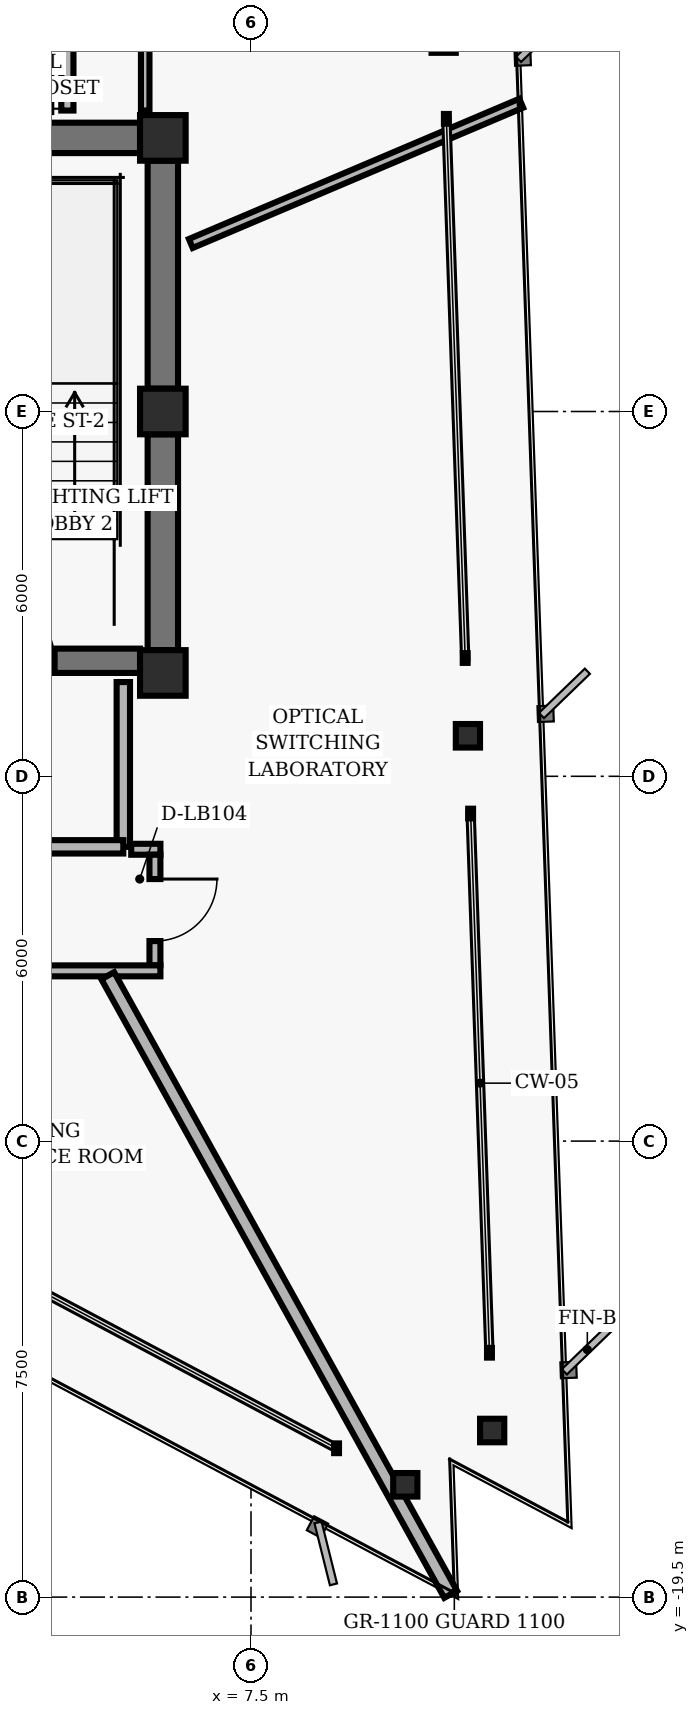
"""IFC4 building model, lengths in metres.
Left out: names, types, materials, properties, quantities, classifications, styles, units other than length and angle.
Written with IfcOpenShell. Run it as: python <this file> out.ifc"""

import sys

from ifc_helpers import new_model, si_unit, direction, frame, frame_2d, origin, origin_2d, place, context, subcontext, project, spatial, rectangle, hollow_rectangle, i_section, extrude, element, fill, save


model = new_model("IFC4")
c1 = context("Model", 3, precision=1e-05, world=origin(), true_north=direction((0.0, 1.0)))
c2 = subcontext(c1, "Body", "Model", "MODEL_VIEW")
j1 = project(units=[si_unit("LENGTHUNIT", "METRE"), si_unit("PLANEANGLEUNIT", "RADIAN")], contexts=[c1])
p1 = place(None, origin())
s1 = spatial("IfcSite", under=j1, at=p1, CompositionType="ELEMENT")
p2 = place(p1, origin())
s2 = spatial("IfcBuilding", under=s1, at=p2, CompositionType="ELEMENT")
p3 = place(p2, frame((0.0, 0.0, 199.68)))
s3 = spatial("IfcBuildingStorey", under=s2, at=p3, CompositionType="ELEMENT", Elevation=199.68)
for number, where, z_axis, x_axis in (
    (1, (6.05, 4.5, 0.0), (0.0, 0.0, 1.0), (1.0, 0.0, 0.0)),
    (2, (6.05, 0.0, 0.0), (0.0, 0.0, 1.0), (1.0, 0.0, 0.0)),
    (3, (6.05, -4.3, 0.0), (0.0, 0.0, 1.0), (1.0, 0.0, 0.0)),
):
    element("IfcColumn", number, at=place(p3, frame(where, z_axis=z_axis, x_axis=x_axis)), inside=s3, PredefinedType="COLUMN", context=c2, shape_type="SweptSolid", body=[
        extrude(hollow_rectangle(XDim=0.75, YDim=0.75, WallThickness=0.05, InnerFilletRadius=0.02, OuterFilletRadius=0.04, at=origin_2d()), origin(), (0.0, 0.0, 1.0), 3.04),
    ])
p4 = place(p3, frame((6.05, 0.375, 0.0), z_axis=(0.0, 0.0, 1.0), x_axis=(0.0, 1.0, 0.0)))
e4 = element("IfcWall", 4, at=p4, inside=s3, PredefinedType="SHEAR", context=c2, shape_type="SweptSolid", body=[
    extrude(rectangle(XDim=3.75, YDim=0.5, at=frame_2d((1.875, 0.0))), origin(), (0.0, 0.0, 1.0), 2.798),
])
p5 = place(p3, frame((6.05, -3.925, 0.0), z_axis=(0.0, 0.0, 1.0), x_axis=(0.0, 1.0, 0.0)))
e5 = element("IfcWall", 5, at=p5, inside=s3, PredefinedType="SHEAR", context=c2, shape_type="SweptSolid", body=[
    extrude(rectangle(XDim=3.55, YDim=0.5, at=frame_2d((1.775, 0.0))), origin(), (0.0, 0.0, 1.0), 2.798),
])
p6 = place(p3, frame((-5.675, -4.1, 0.0), z_axis=(0.0, 0.0, 1.0), x_axis=(1.0, 0.0, 0.0)))
e6 = element("IfcWall", 6, at=p6, inside=s3, PredefinedType="SHEAR", context=c2, shape_type="SweptSolid", body=[
    extrude(rectangle(XDim=11.35, YDim=0.4, at=frame_2d((5.675, 0.0))), origin(), (0.0, 0.0, 1.0), 2.798),
])
p7 = place(p6, frame((1.405, 0.0, 0.0)))
e7 = element("IfcOpeningElement", 7, at=p7, cuts=e6, PredefinedType="OPENING", context=c2, shape_type="SweptSolid", body=[
    extrude(rectangle(XDim=1.1, YDim=2.04, at=frame_2d((0.55, 1.02))), frame((0.0, 0.21, 0.0), z_axis=(0.0, -1.0, 0.0), x_axis=(1.0, 0.0, 0.0)), (0.0, 0.0, 1.0), 0.42),
])
p8 = place(p6, frame((8.845, 0.0, 0.0)))
e8 = element("IfcOpeningElement", 8, at=p8, cuts=e6, PredefinedType="OPENING", context=c2, shape_type="SweptSolid", body=[
    extrude(rectangle(XDim=1.1, YDim=2.04, at=frame_2d((0.55, 1.02))), frame((0.0, 0.21, 0.0), z_axis=(0.0, -1.0, 0.0), x_axis=(1.0, 0.0, 0.0)), (0.0, 0.0, 1.0), 0.42),
])
p9 = place(p6, frame((4.145, 0.0, 0.0)))
e9 = element("IfcOpeningElement", 9, at=p9, cuts=e6, PredefinedType="OPENING", context=c2, shape_type="SweptSolid", body=[
    extrude(rectangle(XDim=1.06, YDim=2.04, at=frame_2d((0.53, 1.02))), frame((0.0, 0.21, 0.0), z_axis=(0.0, -1.0, 0.0), x_axis=(1.0, 0.0, 0.0)), (0.0, 0.0, 1.0), 0.42),
])
p10 = place(p6, frame((6.145, 0.0, 0.0)))
e10 = element("IfcOpeningElement", 10, at=p10, cuts=e6, PredefinedType="OPENING", context=c2, shape_type="SweptSolid", body=[
    extrude(rectangle(XDim=1.06, YDim=2.04, at=frame_2d((0.53, 1.02))), frame((0.0, 0.21, 0.0), z_axis=(0.0, -1.0, 0.0), x_axis=(1.0, 0.0, 0.0)), (0.0, 0.0, 1.0), 0.42),
])
p11 = place(p3, frame((2.05, 4.5, 0.0), z_axis=(0.0, 0.0, 1.0), x_axis=(1.0, 0.0, 0.0)))
e11 = element("IfcWall", 11, at=p11, inside=s3, PredefinedType="SHEAR", context=c2, shape_type="SweptSolid", body=[
    extrude(rectangle(XDim=3.625, YDim=0.5, at=frame_2d((1.812, 0.0))), origin(), (0.0, 0.0, 1.0), 2.798),
])
for number, where, z_axis, x_axis in (
    (12, (11.466, -16.76, 0.0), (0.0, 0.0, 1.0), (1.0, 0.0, 0.0)),
    (13, (11.067, -5.334, 0.0), (0.0, 0.0, 1.0), (1.0, 0.0, 0.0)),
    (14, (10.668, 6.093, 0.0), (0.0, 0.0, 1.0), (1.0, 0.0, 0.0)),
    (15, (10.037, -17.653, 0.0), (0.0, 0.0, 1.0), (1.0, 0.0, 0.0)),
):
    element("IfcColumn", number, at=place(p3, frame(where, z_axis=z_axis, x_axis=x_axis)), inside=s3, PredefinedType="COLUMN", context=c2, shape_type="SweptSolid", body=[
        extrude(i_section(OverallWidth=0.398, OverallDepth=0.387, WebThickness=0.021, FlangeThickness=0.033, FilletRadius=0.018, at=origin_2d()), origin(), (0.0, 0.0, 1.0), 3.04),
    ])
p12 = place(p3, frame((5.4, -7.16, 0.0), z_axis=(0.0, 0.0, 1.0), x_axis=(0.0, 1.0, 0.0)))
e16 = element("IfcWall", 16, at=p12, inside=s3, PredefinedType="PARTITIONING", context=c2, shape_type="SweptSolid", body=[
    extrude(rectangle(XDim=2.71, YDim=0.22, at=frame_2d((1.355, 0.0))), origin(), (0.0, 0.0, 1.0), 2.773),
])
p13 = place(p3, frame((0.0, -7.16, 0.0), z_axis=(0.0, 0.0, 1.0), x_axis=(1.0, 0.0, 0.0)))
e17 = element("IfcWall", 17, at=p13, inside=s3, PredefinedType="PARTITIONING", context=c2, shape_type="SweptSolid", body=[
    extrude(rectangle(XDim=5.4, YDim=0.22, at=frame_2d((2.7, 0.0))), origin(), (0.0, 0.0, 1.0), 2.773),
])
p14 = place(p13, frame((2.05, 0.0, 0.0)))
e18 = element("IfcOpeningElement", 18, at=p14, cuts=e17, PredefinedType="OPENING", context=c2, shape_type="SweptSolid", body=[
    extrude(rectangle(XDim=1.12, YDim=2.02, at=frame_2d((0.56, 1.01))), frame((0.0, 0.12, 0.0), z_axis=(0.0, -1.0, 0.0), x_axis=(1.0, 0.0, 0.0)), (0.0, 0.0, 1.0), 0.24),
])
p15 = place(p3, frame((4.48, 4.95, 0.0), z_axis=(0.0, 0.0, 1.0), x_axis=(0.0, 1.0, 0.0)))
e19 = element("IfcWall", 19, at=p15, inside=s3, PredefinedType="PARTITIONING", context=c2, shape_type="SweptSolid", body=[
    extrude(rectangle(XDim=2.1, YDim=0.2, at=frame_2d((1.05, 0.0))), origin(), (0.0, 0.0, 1.0), 2.773),
])
p16 = place(p3, frame((5.76, 4.95, 0.0), z_axis=(0.0, 0.0, 1.0), x_axis=(0.0, 1.0, 0.0)))
e20 = element("IfcWall", 20, at=p16, inside=s3, PredefinedType="PARTITIONING", context=c2, shape_type="SweptSolid", body=[
    extrude(rectangle(XDim=2.1, YDim=0.14, at=frame_2d((1.05, 0.0))), origin(), (0.0, 0.0, 1.0), 2.253),
])
p17 = place(p3, frame((5.53, -7.2, 0.0), z_axis=(0.0, 0.0, 1.0), x_axis=(1.0, 0.0, 0.0)))
e21 = element("IfcWall", 21, at=p17, inside=s3, PredefinedType="PARTITIONING", context=c2, shape_type="SweptSolid", body=[
    extrude(rectangle(XDim=0.48, YDim=0.18, at=frame_2d((0.24, 0.0))), origin(), (0.0, 0.0, 1.0), 2.773),
])
p18 = place(p3, frame((5.92, -7.29, 0.0), z_axis=(0.0, 0.0, 1.0), x_axis=(0.0, -1.0, 0.0)))
e22 = element("IfcWall", 22, at=p18, inside=s3, PredefinedType="PARTITIONING", context=c2, shape_type="SweptSolid", body=[
    extrude(rectangle(XDim=1.82, YDim=0.18, at=frame_2d((0.91, 0.0))), origin(), (0.0, 0.0, 1.0), 2.773),
])
p19 = place(p18, frame((0.4, 0.0, 0.0)))
e23 = element("IfcOpeningElement", 23, at=p19, cuts=e22, PredefinedType="OPENING", context=c2, shape_type="SweptSolid", body=[
    extrude(rectangle(XDim=1.02, YDim=2.02, at=frame_2d((0.51, 1.01))), frame((0.0, 0.1, 0.0), z_axis=(0.0, -1.0, 0.0), x_axis=(1.0, 0.0, 0.0)), (0.0, 0.0, 1.0), 0.2),
])
p20 = place(p3, frame((6.01, -9.2, 0.0), z_axis=(0.0, 0.0, 1.0), x_axis=(-1.0, 0.0, 0.0)))
e24 = element("IfcWall", 24, at=p20, inside=s3, PredefinedType="PARTITIONING", context=c2, shape_type="SweptSolid", body=[
    extrude(rectangle(XDim=13.3, YDim=0.18, at=frame_2d((6.65, 0.0))), origin(), (0.0, 0.0, 1.0), 2.395),
])
p21 = place(p20, frame((9.948, 0.0, 0.0)))
e25 = element("IfcOpeningElement", 25, at=p21, cuts=e24, PredefinedType="OPENING", context=c2, shape_type="SweptSolid", body=[
    extrude(rectangle(XDim=0.96, YDim=2.02, at=frame_2d((0.48, 1.01))), frame((0.0, 0.1, 0.0), z_axis=(0.0, -1.0, 0.0), x_axis=(1.0, 0.0, 0.0)), (0.0, 0.0, 1.0), 0.2),
])
p22 = place(p20, frame((3.857, 0.0, 0.0)))
e26 = element("IfcOpeningElement", 26, at=p22, cuts=e24, PredefinedType="OPENING", context=c2, shape_type="SweptSolid", body=[
    extrude(rectangle(XDim=0.96, YDim=2.02, at=frame_2d((0.48, 1.01))), frame((0.0, 0.1, 0.0), z_axis=(0.0, -1.0, 0.0), x_axis=(1.0, 0.0, 0.0)), (0.0, 0.0, 1.0), 0.2),
])
p23 = place(p3, frame((5.144, -9.28, 0.0), z_axis=(0.0, 0.0, 1.0), x_axis=(0.484798043034, -0.874626124393, 0.0)))
e27 = element("IfcWall", 27, at=p23, inside=s3, PredefinedType="PARTITIONING", context=c2, shape_type="SweptSolid", body=[
    extrude(rectangle(XDim=11.633, YDim=0.24, at=frame_2d((5.816, 0.0))), origin(), (0.0, 0.0, 1.0), 2.253),
])
p24 = place(p3, frame((6.51, 2.763, 0.0), z_axis=(0.0, 0.0, 1.0), x_axis=(0.920487144923, 0.390772844543, 0.0)))
e28 = element("IfcWall", 28, at=p24, inside=s3, PredefinedType="PARTITIONING", context=c2, shape_type="SweptSolid", body=[
    extrude(rectangle(XDim=5.904, YDim=0.16, at=frame_2d((2.952, 0.0))), origin(), (0.0, 0.0, 1.0), 2.773),
])
p25 = place(p8, origin())
e29 = element("IfcDoor", 29, at=p25, inside=s3, OperationType="SINGLE_SWING_LEFT", PredefinedType="DOOR", context=c2, shape_type="SweptSolid", body=[
    extrude(rectangle(XDim=1.1, YDim=2.04, at=frame_2d((0.55, 1.02))), frame((0.0, 0.025, 0.0), z_axis=(0.0, -1.0, 0.0), x_axis=(1.0, 0.0, 0.0)), (0.0, 0.0, 1.0), 0.05),
])
fill(e8, e29)
p26 = place(p19, origin())
e30 = element("IfcDoor", 30, at=p26, inside=s3, OperationType="SINGLE_SWING_LEFT", PredefinedType="DOOR", context=c2, shape_type="SweptSolid", body=[
    extrude(rectangle(XDim=1.02, YDim=2.02, at=frame_2d((0.51, 1.01))), frame((0.0, 0.025, 0.0), z_axis=(0.0, -1.0, 0.0), x_axis=(1.0, 0.0, 0.0)), (0.0, 0.0, 1.0), 0.05),
])
fill(e23, e30)
save(model, sys.argv[1])
